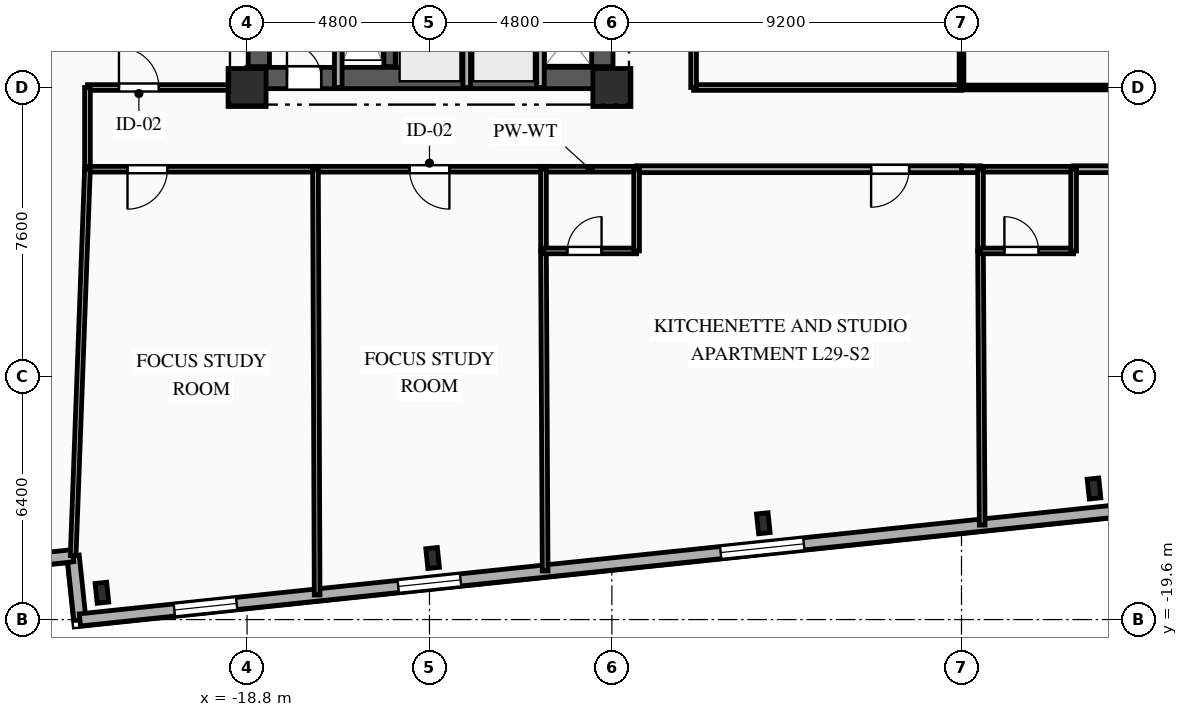
"""IFC4 building model, lengths in metres.
Left out: names, types, materials, properties, quantities, classifications, styles, units other than length and angle.
Written with IfcOpenShell. Run it as: python <this file> out.ifc"""

import sys

from ifc_helpers import new_model, si_unit, direction, frame, frame_2d, origin, origin_2d, place, context, subcontext, project, spatial, rectangle, i_section, extrude, element, fill, save


model = new_model("IFC4")
c1 = context("Model", 3, precision=1e-05, world=origin(), true_north=direction((0.0, 1.0)))
c2 = subcontext(c1, "Body", "Model", "MODEL_VIEW")
j1 = project(units=[si_unit("LENGTHUNIT", "METRE"), si_unit("PLANEANGLEUNIT", "RADIAN")], contexts=[c1])
p1 = place(None, origin())
s1 = spatial("IfcSite", under=j1, at=p1, CompositionType="ELEMENT")
p2 = place(p1, origin())
s2 = spatial("IfcBuilding", under=s1, at=p2, CompositionType="ELEMENT")
p3 = place(p2, frame((0.0, 0.0, 105.8)))
s3 = spatial("IfcBuildingStorey", under=s2, at=p3, CompositionType="ELEMENT", Elevation=105.8)
for number, where, z_axis, x_axis in (
    (1, (-18.8, -5.6, 0.0), (0.0, 0.0, 1.0), (1.0, 0.0, 0.0)),
    (2, (-9.2, -5.6, 0.0), (0.0, 0.0, 1.0), (1.0, 0.0, 0.0)),
):
    element("IfcColumn", number, at=place(p3, frame(where, z_axis=z_axis, x_axis=x_axis)), inside=s3, PredefinedType="COLUMN", context=c2, shape_type="SweptSolid", body=[
        extrude(rectangle(XDim=1.0, YDim=1.0, at=origin_2d()), origin(), (0.0, 0.0, 1.0), 3.35),
    ])
for number, where, z_axis, x_axis in (
    (3, (-22.619, -18.895, 0.0), (0.0, 0.0, 1.0), (0.995, 0.105, 0.0)),
    (4, (-13.917, -17.98, 0.0), (0.0, 0.0, 1.0), (0.995, 0.105, 0.0)),
    (5, (-5.215, -17.066, 0.0), (0.0, 0.0, 1.0), (0.995, 0.105, 0.0)),
    (6, (3.487, -16.151, 0.0), (0.0, 0.0, 1.0), (0.995, 0.105, 0.0)),
):
    element("IfcColumn", number, at=place(p3, frame(where, z_axis=z_axis, x_axis=x_axis)), inside=s3, PredefinedType="COLUMN", context=c2, shape_type="SweptSolid", body=[
        extrude(i_section(OverallWidth=0.306, OverallDepth=0.524, WebThickness=0.021, FlangeThickness=0.04, FilletRadius=0.027, at=origin_2d()), origin(), (0.0, 0.0, 1.0), 3.35),
    ])
for number, where, z_axis, x_axis in (
    (7, (-23.198, -19.609, 0.0), (0.0, 0.0, 1.0), (-0.105, 0.995, 0.0)),
    (8, (-23.376, -17.919, 0.0), (0.0, 0.0, 1.0), (-0.995, -0.105, 0.0)),
):
    element("IfcWall", number, at=place(p3, frame(where, z_axis=z_axis, x_axis=x_axis)), inside=s3, PredefinedType="SOLIDWALL", context=c2, shape_type="SweptSolid", body=[
        extrude(rectangle(XDim=1.7, YDim=0.32, at=frame_2d((0.85, 0.0))), origin(), (0.0, 0.0, 1.0), 3.045),
    ])
p4 = place(p3, frame((30.307, -13.986, 0.0), z_axis=(0.0, 0.0, 1.0), x_axis=(-0.994521628355, -0.104531003701, 0.0)))
e9 = element("IfcWall", 9, at=p4, inside=s3, PredefinedType="SOLIDWALL", context=c2, shape_type="SweptSolid", body=[
    extrude(rectangle(XDim=53.8, YDim=0.32, at=frame_2d((26.9, 0.0))), origin(), (0.0, 0.0, 1.0), 3.045),
])
p5 = place(p4, frame((3.098, 0.0, 0.85)))
e10 = element("IfcOpeningElement", 10, at=p5, cuts=e9, PredefinedType="OPENING", context=c2, shape_type="SweptSolid", body=[
    extrude(rectangle(XDim=1.65, YDim=1.85, at=frame_2d((0.825, 0.925))), frame((0.0, 0.17, 0.0), z_axis=(0.0, -1.0, 0.0), x_axis=(1.0, 0.0, 0.0)), (0.0, 0.0, 1.0), 0.34),
])
p6 = place(p4, frame((9.302, 0.0, 0.85)))
e11 = element("IfcOpeningElement", 11, at=p6, cuts=e9, PredefinedType="OPENING", context=c2, shape_type="SweptSolid", body=[
    extrude(rectangle(XDim=1.65, YDim=1.85, at=frame_2d((0.825, 0.925))), frame((0.0, 0.17, 0.0), z_axis=(0.0, -1.0, 0.0), x_axis=(1.0, 0.0, 0.0)), (0.0, 0.0, 1.0), 0.34),
])
p7 = place(p4, frame((14.827, 0.0, 0.85)))
e12 = element("IfcOpeningElement", 12, at=p7, cuts=e9, PredefinedType="OPENING", context=c2, shape_type="SweptSolid", body=[
    extrude(rectangle(XDim=1.65, YDim=1.85, at=frame_2d((0.825, 0.925))), frame((0.0, 0.17, 0.0), z_axis=(0.0, -1.0, 0.0), x_axis=(1.0, 0.0, 0.0)), (0.0, 0.0, 1.0), 0.34),
])
p8 = place(p4, frame((23.078, 0.0, 0.85)))
e13 = element("IfcOpeningElement", 13, at=p8, cuts=e9, PredefinedType="OPENING", context=c2, shape_type="SweptSolid", body=[
    extrude(rectangle(XDim=2.2, YDim=1.85, at=frame_2d((1.1, 0.925))), frame((0.0, 0.17, 0.0), z_axis=(0.0, -1.0, 0.0), x_axis=(1.0, 0.0, 0.0)), (0.0, 0.0, 1.0), 0.34),
])
p9 = place(p4, frame((34.646, 0.0, 0.85)))
e14 = element("IfcOpeningElement", 14, at=p9, cuts=e9, PredefinedType="OPENING", context=c2, shape_type="SweptSolid", body=[
    extrude(rectangle(XDim=2.2, YDim=1.85, at=frame_2d((1.1, 0.925))), frame((0.0, 0.17, 0.0), z_axis=(0.0, -1.0, 0.0), x_axis=(1.0, 0.0, 0.0)), (0.0, 0.0, 1.0), 0.34),
])
p10 = place(p4, frame((43.728, 0.0, 0.85)))
e15 = element("IfcOpeningElement", 15, at=p10, cuts=e9, PredefinedType="OPENING", context=c2, shape_type="SweptSolid", body=[
    extrude(rectangle(XDim=1.65, YDim=1.85, at=frame_2d((0.825, 0.925))), frame((0.0, 0.17, 0.0), z_axis=(0.0, -1.0, 0.0), x_axis=(1.0, 0.0, 0.0)), (0.0, 0.0, 1.0), 0.34),
])
p11 = place(p4, frame((49.653, 0.0, 0.85)))
e16 = element("IfcOpeningElement", 16, at=p11, cuts=e9, PredefinedType="OPENING", context=c2, shape_type="SweptSolid", body=[
    extrude(rectangle(XDim=1.65, YDim=1.85, at=frame_2d((0.825, 0.925))), frame((0.0, 0.17, 0.0), z_axis=(0.0, -1.0, 0.0), x_axis=(1.0, 0.0, 0.0)), (0.0, 0.0, 1.0), 0.34),
])
p12 = place(p3, frame((-18.8, -5.35, 0.0), z_axis=(0.0, 0.0, 1.0), x_axis=(1.0, 0.0, 0.0)))
e17 = element("IfcWall", 17, at=p12, inside=s3, PredefinedType="SHEAR", context=c2, shape_type="SweptSolid", body=[
    extrude(rectangle(XDim=9.6, YDim=0.56, at=frame_2d((4.8, 0.0))), origin(), (0.0, 0.0, 1.0), 3.045),
])
p13 = place(p12, frame((1.05, 0.0, 0.0)))
e18 = element("IfcOpeningElement", 18, at=p13, cuts=e17, PredefinedType="OPENING", context=c2, shape_type="SweptSolid", body=[
    extrude(rectangle(XDim=0.9, YDim=2.1, at=frame_2d((0.45, 1.05))), frame((0.0, 0.29, 0.0), z_axis=(0.0, -1.0, 0.0), x_axis=(1.0, 0.0, 0.0)), (0.0, 0.0, 1.0), 0.58),
])
p14 = place(p3, frame((-18.49, -5.05, 0.0), z_axis=(0.0, 0.0, 1.0), x_axis=(0.0, 1.0, 0.0)))
e19 = element("IfcWall", 19, at=p14, inside=s3, PredefinedType="SHEAR", context=c2, shape_type="SweptSolid", body=[
    extrude(rectangle(XDim=10.1, YDim=0.56, at=frame_2d((5.05, 0.0))), origin(), (0.0, 0.0, 1.0), 3.045),
])
p15 = place(p3, frame((-9.45, -5.05, 0.0), z_axis=(0.0, 0.0, 1.0), x_axis=(0.0, 1.0, 0.0)))
e20 = element("IfcWall", 20, at=p15, inside=s3, PredefinedType="SHEAR", context=c2, shape_type="SweptSolid", body=[
    extrude(rectangle(XDim=10.1, YDim=0.56, at=frame_2d((5.05, 0.0))), origin(), (0.0, 0.0, 1.0), 3.045),
])
p16 = place(p15, frame((7.175, 0.0, 0.0)))
e21 = element("IfcOpeningElement", 21, at=p16, cuts=e20, PredefinedType="OPENING", context=c2, shape_type="SweptSolid", body=[
    extrude(rectangle(XDim=0.9, YDim=2.1, at=frame_2d((0.45, 1.05))), frame((0.0, 0.29, 0.0), z_axis=(0.0, -1.0, 0.0), x_axis=(1.0, 0.0, 0.0)), (0.0, 0.0, 1.0), 0.58),
])
p17 = place(p15, frame((2.4, 0.0, 0.0)))
e22 = element("IfcOpeningElement", 22, at=p17, cuts=e20, PredefinedType="OPENING", context=c2, shape_type="SweptSolid", body=[
    extrude(rectangle(XDim=1.2, YDim=2.15, at=frame_2d((0.6, 1.075))), frame((0.0, 0.29, 0.0), z_axis=(0.0, -1.0, 0.0), x_axis=(1.0, 0.0, 0.0)), (0.0, 0.0, 1.0), 0.58),
])
p18 = place(p3, frame((-15.05, -5.05, 0.0), z_axis=(0.0, 0.0, 1.0), x_axis=(0.0, 1.0, 0.0)))
e23 = element("IfcWall", 23, at=p18, inside=s3, PredefinedType="SHEAR", context=c2, shape_type="SweptSolid", body=[
    extrude(rectangle(XDim=10.1, YDim=0.3, at=frame_2d((5.05, 0.0))), origin(), (0.0, 0.0, 1.0), 3.045),
])
p19 = place(p3, frame((-16.4, -5.6, 0.0), z_axis=(0.0, 0.0, 1.0), x_axis=(0.0, 1.0, 0.0)))
e24 = element("IfcWall", 24, at=p19, inside=s3, PredefinedType="PARTITIONING", context=c2, shape_type="SweptSolid", body=[
    extrude(rectangle(XDim=3.49, YDim=0.2, at=frame_2d((1.745, 0.0))), origin(), (0.0, 0.0, 1.0), 3.045),
])
for number, where, z_axis, x_axis in (
    (25, (-13.02, -5.6, 0.0), (0.0, 0.0, 1.0), (0.0, 1.0, 0.0)),
    (26, (-11.08, -5.6, 0.0), (0.0, 0.0, 1.0), (0.0, 1.0, 0.0)),
):
    element("IfcWall", number, at=place(p3, frame(where, z_axis=z_axis, x_axis=x_axis)), inside=s3, PredefinedType="PARTITIONING", context=c2, shape_type="SweptSolid", body=[
        extrude(rectangle(XDim=2.25, YDim=0.2, at=frame_2d((1.125, 0.0))), origin(), (0.0, 0.0, 1.0), 3.045),
    ])
p20 = place(p3, frame((-23.0, -5.6, 0.0), z_axis=(0.0, 0.0, 1.0), x_axis=(1.0, 0.0, 0.0)))
e27 = element("IfcWall", 27, at=p20, inside=s3, PredefinedType="PARTITIONING", context=c2, shape_type="SweptSolid", body=[
    extrude(rectangle(XDim=4.2, YDim=0.15, at=frame_2d((2.1, 0.0))), origin(), (0.0, 0.0, 1.0), 3.045),
])
p21 = place(p20, frame((0.829, 0.0, 0.0)))
e28 = element("IfcOpeningElement", 28, at=p21, cuts=e27, PredefinedType="OPENING", context=c2, shape_type="SweptSolid", body=[
    extrude(rectangle(XDim=1.05, YDim=2.15, at=frame_2d((0.525, 1.075))), frame((0.0, 0.085, 0.0), z_axis=(0.0, -1.0, 0.0), x_axis=(1.0, 0.0, 0.0)), (0.0, 0.0, 1.0), 0.17),
])
p22 = place(p3, frame((-23.0, -7.75, 0.0), z_axis=(0.0, 0.0, 1.0), x_axis=(0.0, 1.0, 0.0)))
e29 = element("IfcWall", 29, at=p22, inside=s3, PredefinedType="PARTITIONING", context=c2, shape_type="SweptSolid", body=[
    extrude(rectangle(XDim=2.15, YDim=0.15, at=frame_2d((1.075, 0.0))), origin(), (0.0, 0.0, 1.0), 2.7),
])
p23 = place(p3, frame((-17.0, -7.75, 0.0), z_axis=(0.0, 0.0, 1.0), x_axis=(-1.0, 0.0, 0.0)))
e30 = element("IfcWall", 30, at=p23, inside=s3, PredefinedType="PARTITIONING", context=c2, shape_type="SweptSolid", body=[
    extrude(rectangle(XDim=6.0, YDim=0.15, at=frame_2d((3.0, 0.0))), origin(), (0.0, 0.0, 1.0), 3.045),
])
p24 = place(p23, frame((3.896, 0.0, 0.0)))
e31 = element("IfcOpeningElement", 31, at=p24, cuts=e30, PredefinedType="OPENING", context=c2, shape_type="SweptSolid", body=[
    extrude(rectangle(XDim=1.05, YDim=2.15, at=frame_2d((0.525, 1.075))), frame((0.0, 0.085, 0.0), z_axis=(0.0, -1.0, 0.0), x_axis=(1.0, 0.0, 0.0)), (0.0, 0.0, 1.0), 0.17),
])
p25 = place(p3, frame((-11.0, -7.75, 0.0), z_axis=(0.0, 0.0, 1.0), x_axis=(-1.0, 0.0, 0.0)))
e32 = element("IfcWall", 32, at=p25, inside=s3, PredefinedType="PARTITIONING", context=c2, shape_type="SweptSolid", body=[
    extrude(rectangle(XDim=6.0, YDim=0.15, at=frame_2d((3.0, 0.0))), origin(), (0.0, 0.0, 1.0), 3.045),
])
p26 = place(p25, frame((2.475, 0.0, 0.0)))
e33 = element("IfcOpeningElement", 33, at=p26, cuts=e32, PredefinedType="OPENING", context=c2, shape_type="SweptSolid", body=[
    extrude(rectangle(XDim=1.05, YDim=2.15, at=frame_2d((0.525, 1.075))), frame((0.0, 0.085, 0.0), z_axis=(0.0, -1.0, 0.0), x_axis=(1.0, 0.0, 0.0)), (0.0, 0.0, 1.0), 0.17),
])
p27 = place(p3, frame((0.0, -7.75, 0.0), z_axis=(0.0, 0.0, 1.0), x_axis=(-1.0, 0.0, 0.0)))
e34 = element("IfcWall", 34, at=p27, inside=s3, PredefinedType="PARTITIONING", context=c2, shape_type="SweptSolid", body=[
    extrude(rectangle(XDim=8.55, YDim=0.18, at=frame_2d((4.275, 0.0))), origin(), (0.0, 0.0, 1.0), 3.045),
])
p28 = place(p27, frame((1.379, 0.0, 0.0)))
e35 = element("IfcOpeningElement", 35, at=p28, cuts=e34, PredefinedType="OPENING", context=c2, shape_type="SweptSolid", body=[
    extrude(rectangle(XDim=1.0, YDim=2.15, at=frame_2d((0.5, 1.075))), frame((0.0, 0.1, 0.0), z_axis=(0.0, -1.0, 0.0), x_axis=(1.0, 0.0, 0.0)), (0.0, 0.0, 1.0), 0.2),
])
p29 = place(p3, frame((-8.55, -7.75, 0.0), z_axis=(0.0, 0.0, 1.0), x_axis=(-1.0, 0.0, 0.0)))
e36 = element("IfcWall", 36, at=p29, inside=s3, PredefinedType="PLUMBINGWALL", context=c2, shape_type="SweptSolid", body=[
    extrude(rectangle(XDim=2.45, YDim=0.15, at=frame_2d((1.225, 0.0))), origin(), (0.0, 0.0, 1.0), 3.045),
])
p30 = place(p3, frame((-7.05, -5.6, 0.0), z_axis=(0.0, 0.0, 1.0), x_axis=(1.0, 0.0, 0.0)))
e37 = element("IfcWall", 37, at=p30, inside=s3, PredefinedType="PARTITIONING", context=c2, shape_type="SweptSolid", body=[
    extrude(rectangle(XDim=7.05, YDim=0.15, at=frame_2d((3.525, 0.0))), origin(), (0.0, 0.0, 1.0), 2.53),
])
p31 = place(p3, frame((0.5, -7.75, 0.0), z_axis=(0.0, 0.0, 1.0), x_axis=(-1.0, 0.0, 0.0)))
e38 = element("IfcWall", 38, at=p31, inside=s3, PredefinedType="PARTITIONING", context=c2, shape_type="SweptSolid", body=[
    extrude(rectangle(XDim=0.5, YDim=0.18, at=frame_2d((0.25, 0.0))), origin(), (0.0, 0.0, 1.0), 3.045),
])
p32 = place(p3, frame((12.0, -7.75, 0.0), z_axis=(0.0, 0.0, 1.0), x_axis=(-1.0, 0.0, 0.0)))
e39 = element("IfcWall", 39, at=p32, inside=s3, PredefinedType="PARTITIONING", context=c2, shape_type="SweptSolid", body=[
    extrude(rectangle(XDim=9.05, YDim=0.18, at=frame_2d((4.525, 0.0))), origin(), (0.0, 0.0, 1.0), 3.045),
])
p33 = place(p32, frame((6.609, 0.0, 0.0)))
e40 = element("IfcOpeningElement", 40, at=p33, cuts=e39, PredefinedType="OPENING", context=c2, shape_type="SweptSolid", body=[
    extrude(rectangle(XDim=1.0, YDim=2.15, at=frame_2d((0.5, 1.075))), frame((0.0, 0.1, 0.0), z_axis=(0.0, -1.0, 0.0), x_axis=(1.0, 0.0, 0.0)), (0.0, 0.0, 1.0), 0.2),
])
p34 = place(p3, frame((2.95, -7.75, 0.0), z_axis=(0.0, 0.0, 1.0), x_axis=(-1.0, 0.0, 0.0)))
e41 = element("IfcWall", 41, at=p34, inside=s3, PredefinedType="PLUMBINGWALL", context=c2, shape_type="SweptSolid", body=[
    extrude(rectangle(XDim=2.45, YDim=0.15, at=frame_2d((1.225, 0.0))), origin(), (0.0, 0.0, 1.0), 3.045),
])
p35 = place(p3, frame((0.0, -5.6, 0.0), z_axis=(0.0, 0.0, 1.0), x_axis=(1.0, 0.0, 0.0)))
e42 = element("IfcWall", 42, at=p35, inside=s3, PredefinedType="PARTITIONING", context=c2, shape_type="SweptSolid", body=[
    extrude(rectangle(XDim=7.05, YDim=0.125, at=frame_2d((3.525, 0.0))), origin(), (0.0, 0.0, 1.0), 2.53),
])
p36 = place(p3, frame((-7.05, 8.5, 0.0), z_axis=(0.0, 0.0, 1.0), x_axis=(0.0, -1.0, 0.0)))
e43 = element("IfcWall", 43, at=p36, inside=s3, PredefinedType="PARTITIONING", context=c2, shape_type="SweptSolid", body=[
    extrude(rectangle(XDim=14.1, YDim=0.15, at=frame_2d((7.05, 0.0))), origin(), (0.0, 0.0, 1.0), 3.045),
])
p37 = place(p36, frame((8.074, 0.0, 0.0)))
e44 = element("IfcOpeningElement", 44, at=p37, cuts=e43, PredefinedType="OPENING", context=c2, shape_type="SweptSolid", body=[
    extrude(rectangle(XDim=0.95, YDim=2.1, at=frame_2d((0.475, 1.05))), frame((0.0, 0.085, 0.0), z_axis=(0.0, -1.0, 0.0), x_axis=(1.0, 0.0, 0.0)), (0.0, 0.0, 1.0), 0.17),
])
p38 = place(p3, frame((-23.0, -7.75, 0.0), z_axis=(0.0, 0.0, 1.0), x_axis=(-0.036924695214, -0.999318050914, 0.0)))
e45 = element("IfcWall", 45, at=p38, inside=s3, PredefinedType="PARTITIONING", context=c2, shape_type="SweptSolid", body=[
    extrude(rectangle(XDim=10.176, YDim=0.15, at=frame_2d((5.088, 0.0))), origin(), (0.0, 0.0, 1.0), 3.045),
])
p39 = place(p3, frame((-17.0, -7.75, 0.0), z_axis=(0.0, 0.0, 1.0), x_axis=(0.003922478487, -0.999992307052, 0.0)))
e46 = element("IfcWall", 46, at=p39, inside=s3, PredefinedType="PARTITIONING", context=c2, shape_type="SweptSolid", body=[
    extrude(rectangle(XDim=11.203, YDim=0.15, at=frame_2d((5.602, 0.0))), origin(), (0.0, 0.0, 1.0), 3.045),
])
p40 = place(p3, frame((-11.0, -9.9, 0.0), z_axis=(0.0, 0.0, 1.0), x_axis=(0.005217320294, -0.999986389692, 0.0)))
e47 = element("IfcWall", 47, at=p40, inside=s3, PredefinedType="PARTITIONING", context=c2, shape_type="SweptSolid", body=[
    extrude(rectangle(XDim=8.423, YDim=0.15, at=frame_2d((4.211, 0.0))), origin(), (0.0, 0.0, 1.0), 3.045),
])
p41 = place(p3, frame((-11.0, -7.75, 0.0), z_axis=(0.0, 0.0, 1.0), x_axis=(0.0, -1.0, 0.0)))
e48 = element("IfcWall", 48, at=p41, inside=s3, PredefinedType="PLUMBINGWALL", context=c2, shape_type="SweptSolid", body=[
    extrude(rectangle(XDim=2.15, YDim=0.15, at=frame_2d((1.075, 0.0))), origin(), (0.0, 0.0, 1.0), 3.045),
])
p42 = place(p3, frame((-11.0, -9.9, 0.0), z_axis=(0.0, 0.0, 1.0), x_axis=(1.0, 0.0, 0.0)))
e49 = element("IfcWall", 49, at=p42, inside=s3, PredefinedType="PLUMBINGWALL", context=c2, shape_type="SweptSolid", body=[
    extrude(rectangle(XDim=2.45, YDim=0.15, at=frame_2d((1.225, 0.0))), origin(), (0.0, 0.0, 1.0), 3.045),
])
p43 = place(p42, frame((0.629, 0.0, 0.0)))
e50 = element("IfcOpeningElement", 50, at=p43, cuts=e49, PredefinedType="OPENING", context=c2, shape_type="SweptSolid", body=[
    extrude(rectangle(XDim=0.9, YDim=2.1, at=frame_2d((0.45, 1.05))), frame((0.0, 0.085, 0.0), z_axis=(0.0, -1.0, 0.0), x_axis=(1.0, 0.0, 0.0)), (0.0, 0.0, 1.0), 0.17),
])
p44 = place(p3, frame((-8.55, -9.9, 0.0), z_axis=(0.0, 0.0, 1.0), x_axis=(0.0, 1.0, 0.0)))
e51 = element("IfcWall", 51, at=p44, inside=s3, PredefinedType="PLUMBINGWALL", context=c2, shape_type="SweptSolid", body=[
    extrude(rectangle(XDim=2.15, YDim=0.15, at=frame_2d((1.075, 0.0))), origin(), (0.0, 0.0, 1.0), 3.045),
])
p45 = place(p3, frame((0.5, -9.9, 0.0), z_axis=(0.0, 0.0, 1.0), x_axis=(0.006091463685, -0.999981446863, 0.0)))
e52 = element("IfcWall", 52, at=p45, inside=s3, PredefinedType="PARTITIONING", context=c2, shape_type="SweptSolid", body=[
    extrude(rectangle(XDim=7.214, YDim=0.15, at=frame_2d((3.607, 0.0))), origin(), (0.0, 0.0, 1.0), 3.045),
])
p46 = place(p3, frame((0.5, -7.75, 0.0), z_axis=(0.0, 0.0, 1.0), x_axis=(0.0, -1.0, 0.0)))
e53 = element("IfcWall", 53, at=p46, inside=s3, PredefinedType="PLUMBINGWALL", context=c2, shape_type="SweptSolid", body=[
    extrude(rectangle(XDim=2.15, YDim=0.15, at=frame_2d((1.075, 0.0))), origin(), (0.0, 0.0, 1.0), 3.045),
])
p47 = place(p3, frame((0.5, -9.9, 0.0), z_axis=(0.0, 0.0, 1.0), x_axis=(1.0, 0.0, 0.0)))
e54 = element("IfcWall", 54, at=p47, inside=s3, PredefinedType="PLUMBINGWALL", context=c2, shape_type="SweptSolid", body=[
    extrude(rectangle(XDim=2.45, YDim=0.15, at=frame_2d((1.225, 0.0))), origin(), (0.0, 0.0, 1.0), 3.045),
])
p48 = place(p47, frame((0.629, 0.0, 0.0)))
e55 = element("IfcOpeningElement", 55, at=p48, cuts=e54, PredefinedType="OPENING", context=c2, shape_type="SweptSolid", body=[
    extrude(rectangle(XDim=0.9, YDim=2.1, at=frame_2d((0.45, 1.05))), frame((0.0, 0.085, 0.0), z_axis=(0.0, -1.0, 0.0), x_axis=(1.0, 0.0, 0.0)), (0.0, 0.0, 1.0), 0.17),
])
p49 = place(p3, frame((2.95, -9.9, 0.0), z_axis=(0.0, 0.0, 1.0), x_axis=(0.0, 1.0, 0.0)))
e56 = element("IfcWall", 56, at=p49, inside=s3, PredefinedType="PLUMBINGWALL", context=c2, shape_type="SweptSolid", body=[
    extrude(rectangle(XDim=2.15, YDim=0.15, at=frame_2d((1.075, 0.0))), origin(), (0.0, 0.0, 1.0), 3.045),
])
p50 = place(p3, frame((0.0, 8.5, 0.0), z_axis=(0.0, 0.0, 1.0), x_axis=(0.0, -1.0, 0.0)))
e57 = element("IfcWall", 57, at=p50, inside=s3, PredefinedType="PARTITIONING", context=c2, shape_type="SweptSolid", body=[
    extrude(rectangle(XDim=14.1, YDim=0.125, at=frame_2d((7.05, 0.0))), origin(), (0.0, 0.0, 1.0), 3.045),
])
p51 = place(p9, origin())
e58 = element("IfcWindow", 58, at=p51, inside=s3, PartitioningType="SINGLE_PANEL", PredefinedType="WINDOW", context=c2, shape_type="SweptSolid", body=[
    extrude(rectangle(XDim=2.2, YDim=1.85, at=frame_2d((1.1, 0.925))), frame((0.0, 0.03, 0.0), z_axis=(0.0, -1.0, 0.0), x_axis=(1.0, 0.0, 0.0)), (0.0, 0.0, 1.0), 0.06),
])
fill(e14, e58)
p52 = place(p10, origin())
e59 = element("IfcWindow", 59, at=p52, inside=s3, PartitioningType="SINGLE_PANEL", PredefinedType="WINDOW", context=c2, shape_type="SweptSolid", body=[
    extrude(rectangle(XDim=1.65, YDim=1.85, at=frame_2d((0.825, 0.925))), frame((0.0, 0.03, 0.0), z_axis=(0.0, -1.0, 0.0), x_axis=(1.0, 0.0, 0.0)), (0.0, 0.0, 1.0), 0.06),
])
fill(e15, e59)
p53 = place(p11, origin())
e60 = element("IfcWindow", 60, at=p53, inside=s3, PartitioningType="SINGLE_PANEL", PredefinedType="WINDOW", context=c2, shape_type="SweptSolid", body=[
    extrude(rectangle(XDim=1.65, YDim=1.85, at=frame_2d((0.825, 0.925))), frame((0.0, 0.03, 0.0), z_axis=(0.0, -1.0, 0.0), x_axis=(1.0, 0.0, 0.0)), (0.0, 0.0, 1.0), 0.06),
])
fill(e16, e60)
p54 = place(p13, origin())
e61 = element("IfcDoor", 61, at=p54, inside=s3, OperationType="SINGLE_SWING_LEFT", PredefinedType="DOOR", context=c2, shape_type="SweptSolid", body=[
    extrude(rectangle(XDim=0.9, YDim=2.1, at=frame_2d((0.45, 1.05))), frame((0.0, 0.025, 0.0), z_axis=(0.0, -1.0, 0.0), x_axis=(1.0, 0.0, 0.0)), (0.0, 0.0, 1.0), 0.05),
])
fill(e18, e61)
p55 = place(p21, origin())
e62 = element("IfcDoor", 62, at=p55, inside=s3, OperationType="SINGLE_SWING_LEFT", PredefinedType="DOOR", context=c2, shape_type="SweptSolid", body=[
    extrude(rectangle(XDim=1.05, YDim=2.15, at=frame_2d((0.525, 1.075))), frame((0.0, 0.025, 0.0), z_axis=(0.0, -1.0, 0.0), x_axis=(1.0, 0.0, 0.0)), (0.0, 0.0, 1.0), 0.05),
])
fill(e28, e62)
p56 = place(p24, origin())
e63 = element("IfcDoor", 63, at=p56, inside=s3, OperationType="SINGLE_SWING_RIGHT", PredefinedType="DOOR", context=c2, shape_type="SweptSolid", body=[
    extrude(rectangle(XDim=1.05, YDim=2.15, at=frame_2d((0.525, 1.075))), frame((0.0, 0.025, 0.0), z_axis=(0.0, -1.0, 0.0), x_axis=(1.0, 0.0, 0.0)), (0.0, 0.0, 1.0), 0.05),
])
fill(e31, e63)
p57 = place(p26, origin())
e64 = element("IfcDoor", 64, at=p57, inside=s3, OperationType="SINGLE_SWING_LEFT", PredefinedType="DOOR", context=c2, shape_type="SweptSolid", body=[
    extrude(rectangle(XDim=1.05, YDim=2.15, at=frame_2d((0.525, 1.075))), frame((0.0, 0.025, 0.0), z_axis=(0.0, -1.0, 0.0), x_axis=(1.0, 0.0, 0.0)), (0.0, 0.0, 1.0), 0.05),
])
fill(e33, e64)
p58 = place(p28, origin())
e65 = element("IfcDoor", 65, at=p58, inside=s3, OperationType="SINGLE_SWING_RIGHT", PredefinedType="DOOR", context=c2, shape_type="SweptSolid", body=[
    extrude(rectangle(XDim=1.0, YDim=2.15, at=frame_2d((0.5, 1.075))), frame((0.0, 0.025, 0.0), z_axis=(0.0, -1.0, 0.0), x_axis=(1.0, 0.0, 0.0)), (0.0, 0.0, 1.0), 0.05),
])
fill(e35, e65)
p59 = place(p43, origin())
e66 = element("IfcDoor", 66, at=p59, inside=s3, OperationType="SINGLE_SWING_RIGHT", PredefinedType="DOOR", context=c2, shape_type="SweptSolid", body=[
    extrude(rectangle(XDim=0.9, YDim=2.1, at=frame_2d((0.45, 1.05))), frame((0.0, 0.025, 0.0), z_axis=(0.0, -1.0, 0.0), x_axis=(1.0, 0.0, 0.0)), (0.0, 0.0, 1.0), 0.05),
])
fill(e50, e66)
p60 = place(p48, origin())
e67 = element("IfcDoor", 67, at=p60, inside=s3, OperationType="SINGLE_SWING_LEFT", PredefinedType="DOOR", context=c2, shape_type="SweptSolid", body=[
    extrude(rectangle(XDim=0.9, YDim=2.1, at=frame_2d((0.45, 1.05))), frame((0.0, 0.025, 0.0), z_axis=(0.0, -1.0, 0.0), x_axis=(1.0, 0.0, 0.0)), (0.0, 0.0, 1.0), 0.05),
])
fill(e55, e67)
save(model, sys.argv[1])
